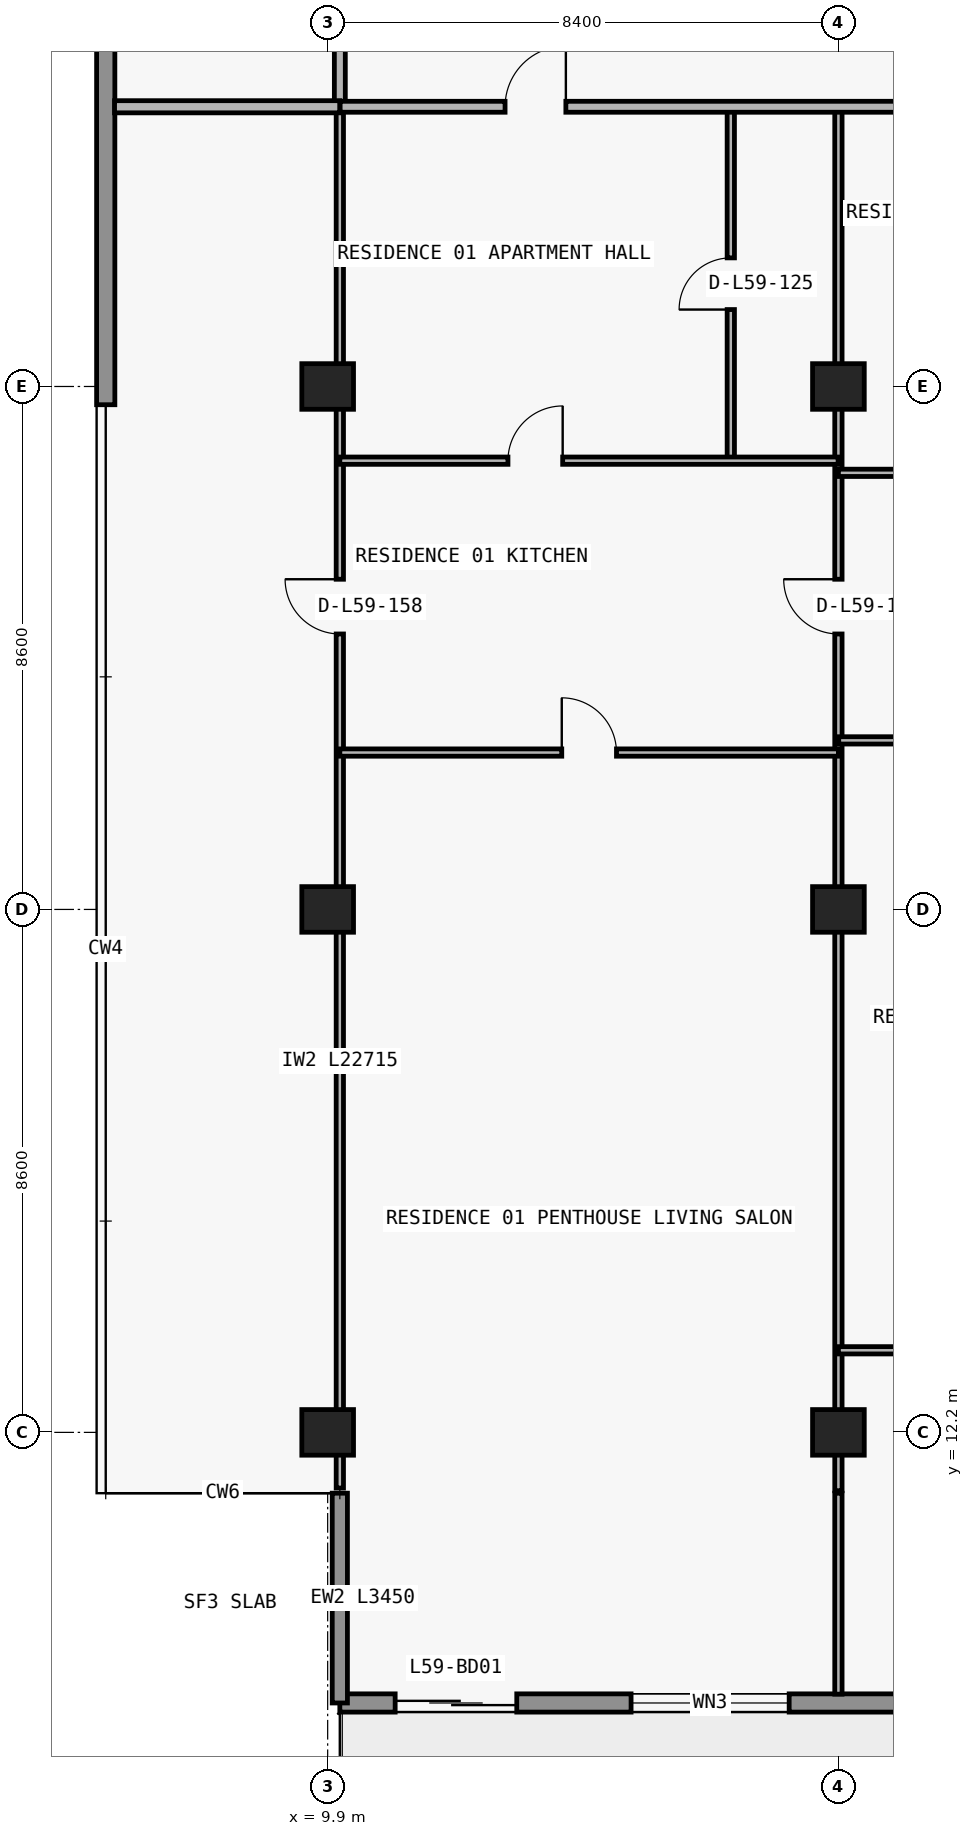
"""IFC4 building model, lengths in metres.
Left out: names, types, materials, properties, quantities, classifications, styles, units other than length and angle.
Written with IfcOpenShell. Run it as: python <this file> out.ifc"""

import sys

from ifc_helpers import new_model, si_unit, direction, frame, frame_2d, origin, origin_2d, place, context, subcontext, project, spatial, rectangle, extrude, element, fill, save


model = new_model("IFC4")
c1 = context("Model", 3, precision=1e-05, world=origin(), true_north=direction((0.0, 1.0)))
c2 = subcontext(c1, "Body", "Model", "MODEL_VIEW")
j1 = project(units=[si_unit("LENGTHUNIT", "METRE"), si_unit("PLANEANGLEUNIT", "RADIAN")], contexts=[c1])
p1 = place(None, origin())
s1 = spatial("IfcSite", under=j1, at=p1, CompositionType="ELEMENT")
p2 = place(p1, origin())
s2 = spatial("IfcBuilding", under=s1, at=p2, CompositionType="ELEMENT")
p3 = place(p2, frame((0.0, 0.0, 211.5)))
s3 = spatial("IfcBuildingStorey", under=s2, at=p3, CompositionType="ELEMENT", Elevation=211.5)
for number, where, z_axis, x_axis in (
    (1, (9.9, 12.2, 0.0), (0.0, 0.0, 1.0), (1.0, 0.0, 0.0)),
    (2, (18.3, 12.2, 0.0), (0.0, 0.0, 1.0), (1.0, 0.0, 0.0)),
    (3, (9.9, 20.8, 0.0), (0.0, 0.0, 1.0), (1.0, 0.0, 0.0)),
    (4, (18.3, 20.8, 0.0), (0.0, 0.0, 1.0), (1.0, 0.0, 0.0)),
    (5, (9.9, 29.4, 0.0), (0.0, 0.0, 1.0), (1.0, 0.0, 0.0)),
    (6, (18.3, 29.4, 0.0), (0.0, 0.0, 1.0), (1.0, 0.0, 0.0)),
):
    element("IfcColumn", number, at=place(p3, frame(where, z_axis=z_axis, x_axis=x_axis)), inside=s3, PredefinedType="COLUMN", context=c2, shape_type="SweptSolid", body=[
        extrude(rectangle(XDim=0.85, YDim=0.75, at=origin_2d()), origin(), (0.0, 0.0, 1.0), 3.05),
    ])
p4 = place(p3, frame((67.7, 7.75, 0.0), z_axis=(0.0, 0.0, 1.0), x_axis=(-1.0, 0.0, 0.0)))
e7 = element("IfcWall", 7, at=p4, inside=s3, PredefinedType="STANDARD", context=c2, shape_type="SweptSolid", body=[
    extrude(rectangle(XDim=57.6, YDim=0.3, at=frame_2d((28.8, 0.0))), origin(), (0.0, 0.0, 1.0), 3.05),
])
p5 = place(p4, frame((54.69, 0.0, 0.0)))
e8 = element("IfcOpeningElement", 8, at=p5, cuts=e7, PredefinedType="OPENING", context=c2, shape_type="SweptSolid", body=[
    extrude(rectangle(XDim=2.0, YDim=2.3, at=frame_2d((1.0, 1.15))), frame((0.0, 0.16, 0.0), z_axis=(0.0, -1.0, 0.0), x_axis=(1.0, 0.0, 0.0)), (0.0, 0.0, 1.0), 0.32),
])
p6 = place(p4, frame((50.21, 0.0, 0.65)))
e9 = element("IfcOpeningElement", 9, at=p6, cuts=e7, PredefinedType="OPENING", context=c2, shape_type="SweptSolid", body=[
    extrude(rectangle(XDim=2.6, YDim=1.85, at=frame_2d((1.3, 0.925))), frame((0.0, 0.16, 0.0), z_axis=(0.0, -1.0, 0.0), x_axis=(1.0, 0.0, 0.0)), (0.0, 0.0, 1.0), 0.32),
])
p7 = place(p4, frame((44.1, 0.0, 0.85)))
e10 = element("IfcOpeningElement", 10, at=p7, cuts=e7, PredefinedType="OPENING", context=c2, shape_type="SweptSolid", body=[
    extrude(rectangle(XDim=2.2, YDim=1.55, at=frame_2d((1.1, 0.775))), frame((0.0, 0.16, 0.0), z_axis=(0.0, -1.0, 0.0), x_axis=(1.0, 0.0, 0.0)), (0.0, 0.0, 1.0), 0.32),
])
p8 = place(p4, frame((38.09, 0.0, 0.0)))
e11 = element("IfcOpeningElement", 11, at=p8, cuts=e7, PredefinedType="OPENING", context=c2, shape_type="SweptSolid", body=[
    extrude(rectangle(XDim=2.0, YDim=2.3, at=frame_2d((1.0, 1.15))), frame((0.0, 0.16, 0.0), z_axis=(0.0, -1.0, 0.0), x_axis=(1.0, 0.0, 0.0)), (0.0, 0.0, 1.0), 0.32),
])
p9 = place(p4, frame((33.41, 0.0, 0.65)))
e12 = element("IfcOpeningElement", 12, at=p9, cuts=e7, PredefinedType="OPENING", context=c2, shape_type="SweptSolid", body=[
    extrude(rectangle(XDim=2.6, YDim=1.85, at=frame_2d((1.3, 0.925))), frame((0.0, 0.16, 0.0), z_axis=(0.0, -1.0, 0.0), x_axis=(1.0, 0.0, 0.0)), (0.0, 0.0, 1.0), 0.32),
])
p10 = place(p4, frame((27.7, 0.0, 0.85)))
e13 = element("IfcOpeningElement", 13, at=p10, cuts=e7, PredefinedType="OPENING", context=c2, shape_type="SweptSolid", body=[
    extrude(rectangle(XDim=2.2, YDim=1.55, at=frame_2d((1.1, 0.775))), frame((0.0, 0.16, 0.0), z_axis=(0.0, -1.0, 0.0), x_axis=(1.0, 0.0, 0.0)), (0.0, 0.0, 1.0), 0.32),
])
p11 = place(p4, frame((19.7, 0.0, 0.85)))
e14 = element("IfcOpeningElement", 14, at=p11, cuts=e7, PredefinedType="OPENING", context=c2, shape_type="SweptSolid", body=[
    extrude(rectangle(XDim=2.2, YDim=1.55, at=frame_2d((1.1, 0.775))), frame((0.0, 0.16, 0.0), z_axis=(0.0, -1.0, 0.0), x_axis=(1.0, 0.0, 0.0)), (0.0, 0.0, 1.0), 0.32),
])
p12 = place(p4, frame((13.69, 0.0, 0.0)))
e15 = element("IfcOpeningElement", 15, at=p12, cuts=e7, PredefinedType="OPENING", context=c2, shape_type="SweptSolid", body=[
    extrude(rectangle(XDim=2.0, YDim=2.3, at=frame_2d((1.0, 1.15))), frame((0.0, 0.16, 0.0), z_axis=(0.0, -1.0, 0.0), x_axis=(1.0, 0.0, 0.0)), (0.0, 0.0, 1.0), 0.32),
])
p13 = place(p4, frame((9.01, 0.0, 0.65)))
e16 = element("IfcOpeningElement", 16, at=p13, cuts=e7, PredefinedType="OPENING", context=c2, shape_type="SweptSolid", body=[
    extrude(rectangle(XDim=2.6, YDim=1.85, at=frame_2d((1.3, 0.925))), frame((0.0, 0.16, 0.0), z_axis=(0.0, -1.0, 0.0), x_axis=(1.0, 0.0, 0.0)), (0.0, 0.0, 1.0), 0.32),
])
p14 = place(p4, frame((3.0, 0.0, 0.85)))
e17 = element("IfcOpeningElement", 17, at=p14, cuts=e7, PredefinedType="OPENING", context=c2, shape_type="SweptSolid", body=[
    extrude(rectangle(XDim=2.2, YDim=1.55, at=frame_2d((1.1, 0.775))), frame((0.0, 0.16, 0.0), z_axis=(0.0, -1.0, 0.0), x_axis=(1.0, 0.0, 0.0)), (0.0, 0.0, 1.0), 0.32),
])
p15 = place(p3, frame((10.1, 11.2, 0.0), z_axis=(0.0, 0.0, 1.0), x_axis=(0.0, -1.0, 0.0)))
e18 = element("IfcWall", 18, at=p15, inside=s3, PredefinedType="ELEMENTEDWALL", context=c2, shape_type="SweptSolid", body=[
    extrude(rectangle(XDim=3.45, YDim=0.25, at=frame_2d((1.725, 0.0))), origin(), (0.0, 0.0, 1.0), 3.05),
])
p16 = place(p3, frame((6.25, 29.1, 0.0), z_axis=(0.0, 0.0, 1.0), x_axis=(0.0, 1.0, 0.0)))
e19 = element("IfcWall", 19, at=p16, inside=s3, PredefinedType="STANDARD", context=c2, shape_type="SweptSolid", body=[
    extrude(rectangle(XDim=17.9, YDim=0.3, at=frame_2d((8.95, 0.0))), origin(), (0.0, 0.0, 1.0), 3.05),
])
p17 = place(p3, frame((10.1, 11.285, 0.0), z_axis=(0.0, 0.0, 1.0), x_axis=(0.0, 1.0, 0.0)))
e20 = element("IfcWall", 20, at=p17, inside=s3, PredefinedType="PARTITIONING", context=c2, shape_type="SweptSolid", body=[
    extrude(rectangle(XDim=22.715, YDim=0.12, at=frame_2d((11.357, 0.0))), origin(), (0.0, 0.0, 1.0), 2.263),
])
p18 = place(p17, frame((14.045, 0.0, 0.0)))
e21 = element("IfcOpeningElement", 21, at=p18, cuts=e20, PredefinedType="OPENING", context=c2, shape_type="SweptSolid", body=[
    extrude(rectangle(XDim=0.9, YDim=2.15, at=frame_2d((0.45, 1.075))), frame((0.0, 0.07, 0.0), z_axis=(0.0, -1.0, 0.0), x_axis=(1.0, 0.0, 0.0)), (0.0, 0.0, 1.0), 0.14),
])
p19 = place(p3, frame((10.1, 34.005, 0.0), z_axis=(0.0, 0.0, 1.0), x_axis=(0.0, 1.0, 0.0)))
e22 = element("IfcWall", 22, at=p19, inside=s3, PredefinedType="PARTITIONING", context=c2, shape_type="SweptSolid", body=[
    extrude(rectangle(XDim=2.995, YDim=0.18, at=frame_2d((1.498, 0.0))), origin(), (0.0, 0.0, 1.0), 2.263),
])
p20 = place(p3, frame((16.53, 28.18, 0.0), z_axis=(0.0, 0.0, 1.0), x_axis=(0.0, 1.0, 0.0)))
e23 = element("IfcWall", 23, at=p20, inside=s3, PredefinedType="PARTITIONING", context=c2, shape_type="SweptSolid", body=[
    extrude(rectangle(XDim=5.82, YDim=0.12, at=frame_2d((2.91, 0.0))), origin(), (0.0, 0.0, 1.0), 3.05),
])
p21 = place(p20, frame((2.485, 0.0, 0.0)))
e24 = element("IfcOpeningElement", 24, at=p21, cuts=e23, PredefinedType="OPENING", context=c2, shape_type="SweptSolid", body=[
    extrude(rectangle(XDim=0.85, YDim=2.1, at=frame_2d((0.425, 1.05))), frame((0.0, 0.07, 0.0), z_axis=(0.0, -1.0, 0.0), x_axis=(1.0, 0.0, 0.0)), (0.0, 0.0, 1.0), 0.14),
])
p22 = place(p3, frame((18.3, 7.895, 0.0), z_axis=(0.0, 0.0, 1.0), x_axis=(0.0, 1.0, 0.0)))
e25 = element("IfcWall", 25, at=p22, inside=s3, PredefinedType="PARTITIONING", context=c2, shape_type="SweptSolid", body=[
    extrude(rectangle(XDim=3.305, YDim=0.12, at=frame_2d((1.652, 0.0))), origin(), (0.0, 0.0, 1.0), 3.05),
])
p23 = place(p3, frame((18.3, 11.24, 0.0), z_axis=(0.0, 0.0, 1.0), x_axis=(0.0, 1.0, 0.0)))
e26 = element("IfcWall", 26, at=p23, inside=s3, PredefinedType="PARTITIONING", context=c2, shape_type="SweptSolid", body=[
    extrude(rectangle(XDim=22.76, YDim=0.12, at=frame_2d((11.38, 0.0))), origin(), (0.0, 0.0, 1.0), 2.263),
])
p24 = place(p23, frame((14.09, 0.0, 0.0)))
e27 = element("IfcOpeningElement", 27, at=p24, cuts=e26, PredefinedType="OPENING", context=c2, shape_type="SweptSolid", body=[
    extrude(rectangle(XDim=0.9, YDim=2.15, at=frame_2d((0.45, 1.075))), frame((0.0, 0.07, 0.0), z_axis=(0.0, -1.0, 0.0), x_axis=(1.0, 0.0, 0.0)), (0.0, 0.0, 1.0), 0.14),
])
p25 = place(p3, frame((18.3, 13.55, 0.0), z_axis=(0.0, 0.0, 1.0), x_axis=(1.0, 0.0, 0.0)))
e28 = element("IfcWall", 28, at=p25, inside=s3, PredefinedType="PARTITIONING", context=c2, shape_type="SweptSolid", body=[
    extrude(rectangle(XDim=8.35, YDim=0.12, at=frame_2d((4.175, 0.0))), origin(), (0.0, 0.0, 1.0), 3.05),
])
p26 = place(p25, frame((3.725, 0.0, 0.0)))
e29 = element("IfcOpeningElement", 29, at=p26, cuts=e28, PredefinedType="OPENING", context=c2, shape_type="SweptSolid", body=[
    extrude(rectangle(XDim=0.9, YDim=2.15, at=frame_2d((0.45, 1.075))), frame((0.0, 0.07, 0.0), z_axis=(0.0, -1.0, 0.0), x_axis=(1.0, 0.0, 0.0)), (0.0, 0.0, 1.0), 0.14),
])
p27 = place(p3, frame((10.1, 23.38, 0.0), z_axis=(0.0, 0.0, 1.0), x_axis=(1.0, 0.0, 0.0)))
e30 = element("IfcWall", 30, at=p27, inside=s3, PredefinedType="PARTITIONING", context=c2, shape_type="SweptSolid", body=[
    extrude(rectangle(XDim=8.2, YDim=0.12, at=frame_2d((4.1, 0.0))), origin(), (0.0, 0.0, 1.0), 3.05),
])
p28 = place(p27, frame((3.65, 0.0, 0.0)))
e31 = element("IfcOpeningElement", 31, at=p28, cuts=e30, PredefinedType="OPENING", context=c2, shape_type="SweptSolid", body=[
    extrude(rectangle(XDim=0.9, YDim=2.15, at=frame_2d((0.45, 1.075))), frame((0.0, 0.07, 0.0), z_axis=(0.0, -1.0, 0.0), x_axis=(1.0, 0.0, 0.0)), (0.0, 0.0, 1.0), 0.14),
])
p29 = place(p3, frame((18.305, 23.58, 0.0), z_axis=(0.0, 0.0, 1.0), x_axis=(1.0, 0.0, 0.0)))
e32 = element("IfcWall", 32, at=p29, inside=s3, PredefinedType="PARTITIONING", context=c2, shape_type="SweptSolid", body=[
    extrude(rectangle(XDim=8.175, YDim=0.12, at=frame_2d((4.087, 0.0))), origin(), (0.0, 0.0, 1.0), 3.05),
])
p30 = place(p29, frame((3.637, 0.0, 0.0)))
e33 = element("IfcOpeningElement", 33, at=p30, cuts=e32, PredefinedType="OPENING", context=c2, shape_type="SweptSolid", body=[
    extrude(rectangle(XDim=0.9, YDim=2.15, at=frame_2d((0.45, 1.075))), frame((0.0, 0.07, 0.0), z_axis=(0.0, -1.0, 0.0), x_axis=(1.0, 0.0, 0.0)), (0.0, 0.0, 1.0), 0.14),
])
p31 = place(p3, frame((18.3, 27.98, 0.0), z_axis=(0.0, 0.0, 1.0), x_axis=(1.0, 0.0, 0.0)))
e34 = element("IfcWall", 34, at=p31, inside=s3, PredefinedType="PARTITIONING", context=c2, shape_type="SweptSolid", body=[
    extrude(rectangle(XDim=8.18, YDim=0.12, at=frame_2d((4.09, 0.0))), origin(), (0.0, 0.0, 1.0), 3.05),
])
p32 = place(p31, frame((2.952, 0.0, 0.0)))
e35 = element("IfcOpeningElement", 35, at=p32, cuts=e34, PredefinedType="OPENING", context=c2, shape_type="SweptSolid", body=[
    extrude(rectangle(XDim=0.9, YDim=2.15, at=frame_2d((0.45, 1.075))), frame((0.0, 0.07, 0.0), z_axis=(0.0, -1.0, 0.0), x_axis=(1.0, 0.0, 0.0)), (0.0, 0.0, 1.0), 0.14),
])
p33 = place(p3, frame((10.1, 28.18, 0.0), z_axis=(0.0, 0.0, 1.0), x_axis=(1.0, 0.0, 0.0)))
e36 = element("IfcWall", 36, at=p33, inside=s3, PredefinedType="PARTITIONING", context=c2, shape_type="SweptSolid", body=[
    extrude(rectangle(XDim=8.195, YDim=0.12, at=frame_2d((4.097, 0.0))), origin(), (0.0, 0.0, 1.0), 3.05),
])
p34 = place(p33, frame((2.765, 0.0, 0.0)))
e37 = element("IfcOpeningElement", 37, at=p34, cuts=e36, PredefinedType="OPENING", context=c2, shape_type="SweptSolid", body=[
    extrude(rectangle(XDim=0.9, YDim=2.15, at=frame_2d((0.45, 1.075))), frame((0.0, 0.07, 0.0), z_axis=(0.0, -1.0, 0.0), x_axis=(1.0, 0.0, 0.0)), (0.0, 0.0, 1.0), 0.14),
])
p35 = place(p3, frame((6.395, 34.0, 0.0), z_axis=(0.0, 0.0, 1.0), x_axis=(1.0, 0.0, 0.0)))
e38 = element("IfcWall", 38, at=p35, inside=s3, PredefinedType="PARTITIONING", context=c2, shape_type="SweptSolid", body=[
    extrude(rectangle(XDim=3.705, YDim=0.2, at=frame_2d((1.853, 0.0))), origin(), (0.0, 0.0, 1.0), 3.05),
])
p36 = place(p3, frame((10.105, 34.0, 0.0), z_axis=(0.0, 0.0, 1.0), x_axis=(1.0, 0.0, 0.0)))
e39 = element("IfcWall", 39, at=p36, inside=s3, PredefinedType="PARTITIONING", context=c2, shape_type="SweptSolid", body=[
    extrude(rectangle(XDim=16.545, YDim=0.18, at=frame_2d((8.272, 0.0))), origin(), (0.0, 0.0, 1.0), 3.05),
])
p37 = place(p36, frame((2.712, 0.0, 0.0)))
e40 = element("IfcOpeningElement", 40, at=p37, cuts=e39, PredefinedType="OPENING", context=c2, shape_type="SweptSolid", body=[
    extrude(rectangle(XDim=1.0, YDim=2.2, at=frame_2d((0.5, 1.1))), frame((0.0, 0.1, 0.0), z_axis=(0.0, -1.0, 0.0), x_axis=(1.0, 0.0, 0.0)), (0.0, 0.0, 1.0), 0.2),
])
p38 = place(p5, origin())
e41 = element("IfcDoor", 41, at=p38, inside=s3, OperationType="DOUBLE_DOOR_SLIDING", PredefinedType="DOOR", context=c2, shape_type="SweptSolid", body=[
    extrude(rectangle(XDim=2.0, YDim=2.3, at=frame_2d((1.0, 1.15))), frame((0.0, 0.025, 0.0), z_axis=(0.0, -1.0, 0.0), x_axis=(1.0, 0.0, 0.0)), (0.0, 0.0, 1.0), 0.05),
])
fill(e8, e41)
p39 = place(p6, origin())
e42 = element("IfcWindow", 42, at=p39, inside=s3, PartitioningType="SINGLE_PANEL", PredefinedType="WINDOW", context=c2, shape_type="SweptSolid", body=[
    extrude(rectangle(XDim=2.6, YDim=1.85, at=frame_2d((1.3, 0.925))), frame((0.0, 0.03, 0.0), z_axis=(0.0, -1.0, 0.0), x_axis=(1.0, 0.0, 0.0)), (0.0, 0.0, 1.0), 0.06),
])
fill(e9, e42)
p40 = place(p37, origin())
e43 = element("IfcDoor", 43, at=p40, inside=s3, OperationType="SINGLE_SWING_RIGHT", PredefinedType="DOOR", context=c2, shape_type="SweptSolid", body=[
    extrude(rectangle(XDim=1.0, YDim=2.2, at=frame_2d((0.5, 1.1))), frame((0.0, 0.025, 0.0), z_axis=(0.0, -1.0, 0.0), x_axis=(1.0, 0.0, 0.0)), (0.0, 0.0, 1.0), 0.05),
])
fill(e40, e43)
p41 = place(p21, origin())
e44 = element("IfcDoor", 44, at=p41, inside=s3, OperationType="SINGLE_SWING_LEFT", PredefinedType="DOOR", context=c2, shape_type="SweptSolid", body=[
    extrude(rectangle(XDim=0.85, YDim=2.1, at=frame_2d((0.425, 1.05))), frame((0.0, 0.025, 0.0), z_axis=(0.0, -1.0, 0.0), x_axis=(1.0, 0.0, 0.0)), (0.0, 0.0, 1.0), 0.05),
])
fill(e24, e44)
p42 = place(p34, origin())
e45 = element("IfcDoor", 45, at=p42, inside=s3, OperationType="SINGLE_SWING_RIGHT", PredefinedType="DOOR", context=c2, shape_type="SweptSolid", body=[
    extrude(rectangle(XDim=0.9, YDim=2.15, at=frame_2d((0.45, 1.075))), frame((0.0, 0.025, 0.0), z_axis=(0.0, -1.0, 0.0), x_axis=(1.0, 0.0, 0.0)), (0.0, 0.0, 1.0), 0.05),
])
fill(e37, e45)
p43 = place(p28, origin())
e46 = element("IfcDoor", 46, at=p43, inside=s3, OperationType="SINGLE_SWING_LEFT", PredefinedType="DOOR", context=c2, shape_type="SweptSolid", body=[
    extrude(rectangle(XDim=0.9, YDim=2.15, at=frame_2d((0.45, 1.075))), frame((0.0, 0.025, 0.0), z_axis=(0.0, -1.0, 0.0), x_axis=(1.0, 0.0, 0.0)), (0.0, 0.0, 1.0), 0.05),
])
fill(e31, e46)
p44 = place(p24, origin())
e47 = element("IfcDoor", 47, at=p44, inside=s3, OperationType="SINGLE_SWING_RIGHT", PredefinedType="DOOR", context=c2, shape_type="SweptSolid", body=[
    extrude(rectangle(XDim=0.9, YDim=2.15, at=frame_2d((0.45, 1.075))), frame((0.0, 0.025, 0.0), z_axis=(0.0, -1.0, 0.0), x_axis=(1.0, 0.0, 0.0)), (0.0, 0.0, 1.0), 0.05),
])
fill(e27, e47)
p45 = place(p18, origin())
e48 = element("IfcDoor", 48, at=p45, inside=s3, OperationType="SINGLE_SWING_RIGHT", PredefinedType="DOOR", context=c2, shape_type="SweptSolid", body=[
    extrude(rectangle(XDim=0.9, YDim=2.15, at=frame_2d((0.45, 1.075))), frame((0.0, 0.025, 0.0), z_axis=(0.0, -1.0, 0.0), x_axis=(1.0, 0.0, 0.0)), (0.0, 0.0, 1.0), 0.05),
])
fill(e21, e48)
save(model, sys.argv[1])
